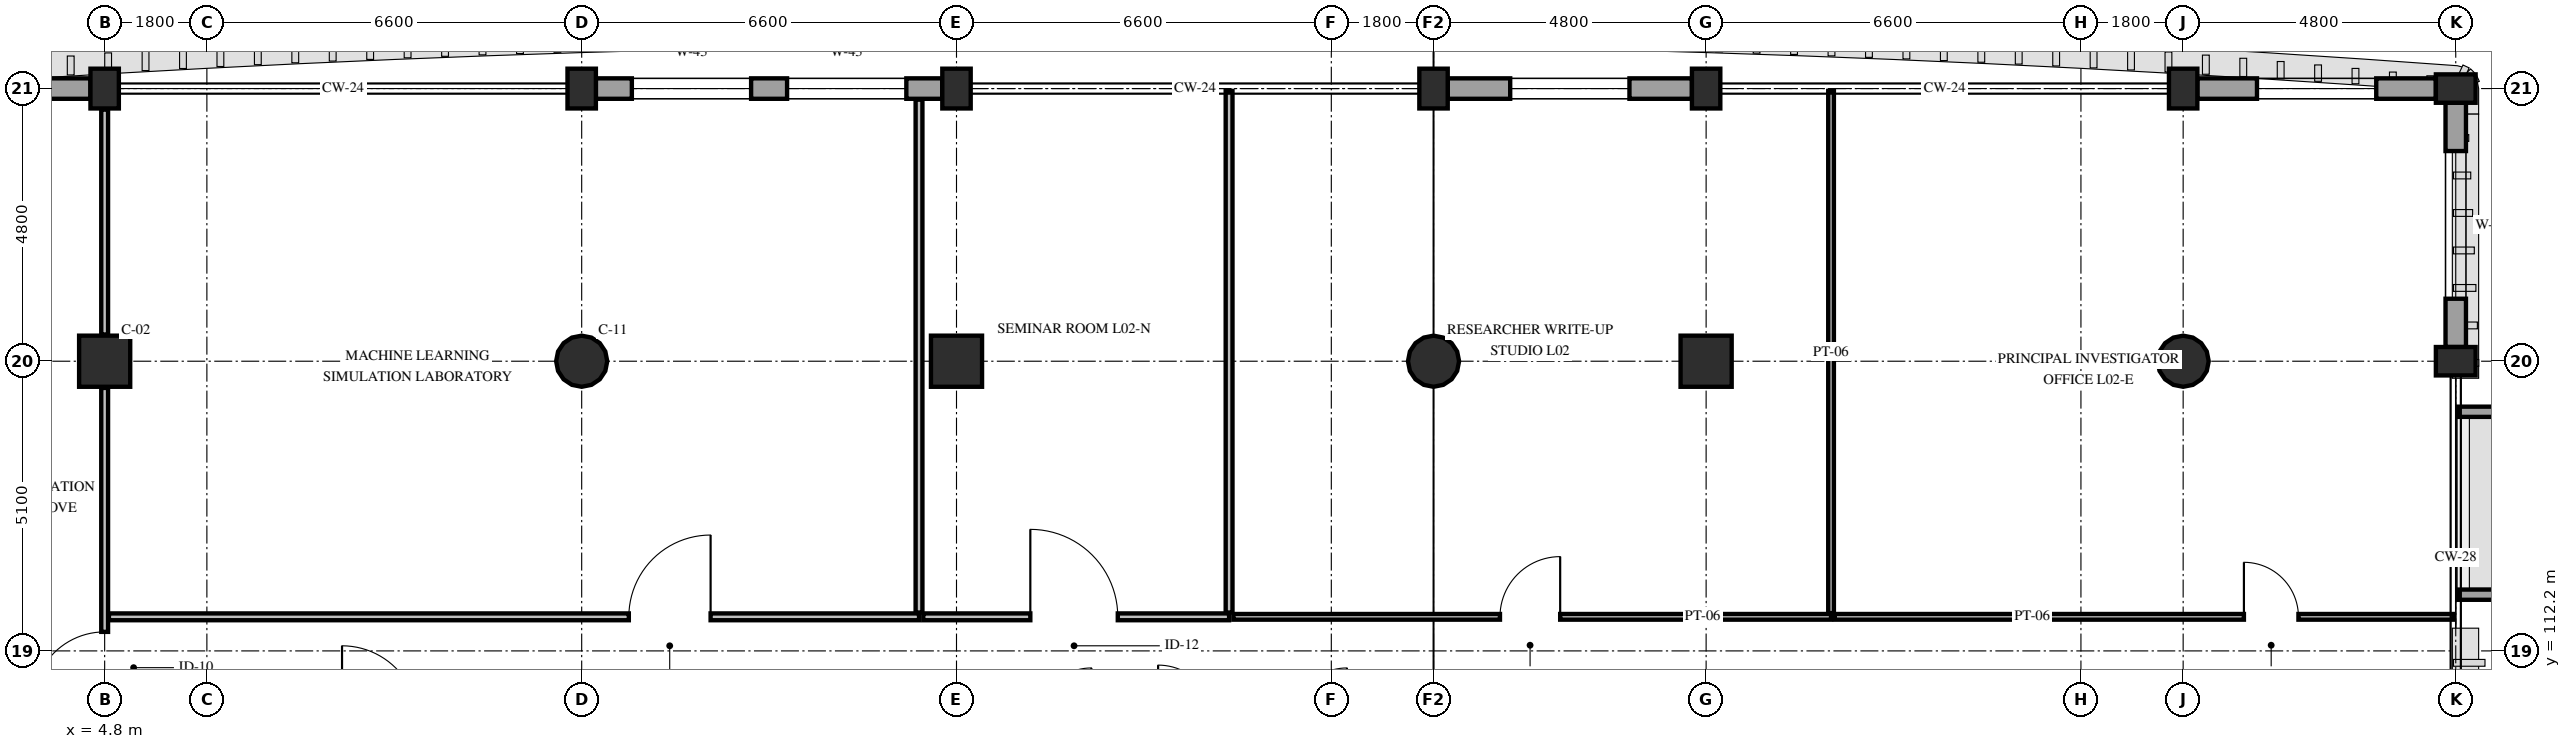
"""IFC4 building model, lengths in metres.
Left out: names, types, materials, properties, quantities, classifications, styles, units other than length and angle.
Written with IfcOpenShell. Run it as: python <this file> out.ifc"""

import sys

from ifc_helpers import new_model, si_unit, direction, frame, frame_2d, origin, origin_2d, place, context, subcontext, project, spatial, rectangle, circle, extrude, element, fill, save


model = new_model("IFC4")
c1 = context("Model", 3, precision=1e-05, world=origin(), true_north=direction((0.0, 1.0)))
c2 = subcontext(c1, "Body", "Model", "MODEL_VIEW")
j1 = project(units=[si_unit("LENGTHUNIT", "METRE"), si_unit("PLANEANGLEUNIT", "RADIAN")], contexts=[c1])
p1 = place(None, origin())
s1 = spatial("IfcSite", under=j1, at=p1, CompositionType="ELEMENT")
p2 = place(p1, origin())
s2 = spatial("IfcBuilding", under=s1, at=p2, CompositionType="ELEMENT")
p3 = place(p2, frame((0.0, 0.0, 10.2)))
s3 = spatial("IfcBuildingStorey", under=s2, at=p3, CompositionType="ELEMENT", Elevation=10.2)
p4 = place(p3, frame((4.8, 117.3, 0.0), z_axis=(0.0, 0.0, 1.0), x_axis=(1.0, 0.0, 0.0)))
e1 = element("IfcColumn", 1, at=p4, inside=s3, PredefinedType="COLUMN", context=c2, shape_type="SweptSolid", body=[
    extrude(rectangle(XDim=0.9, YDim=0.9, at=origin_2d()), origin(), (0.0, 0.0, 1.0), 4.8),
])
p5 = place(p3, frame((4.8, 122.1, 0.0), z_axis=(0.0, 0.0, 1.0), x_axis=(1.0, 0.0, 0.0)))
e2 = element("IfcColumn", 2, at=p5, inside=s3, PredefinedType="PILASTER", context=c2, shape_type="SweptSolid", body=[
    extrude(rectangle(XDim=0.5, YDim=0.7, at=origin_2d()), origin(), (0.0, 0.0, 1.0), 4.8),
])
p6 = place(p3, frame((13.2, 117.3, 0.0), z_axis=(0.0, 0.0, 1.0), x_axis=(1.0, 0.0, 0.0)))
e3 = element("IfcColumn", 3, at=p6, inside=s3, PredefinedType="COLUMN", context=c2, shape_type="SweptSolid", body=[
    extrude(circle(Radius=0.45, at=origin_2d()), origin(), (0.0, 0.0, 1.0), 4.8),
])
p7 = place(p3, frame((13.2, 122.1, 0.0), z_axis=(0.0, 0.0, 1.0), x_axis=(1.0, 0.0, 0.0)))
e4 = element("IfcColumn", 4, at=p7, inside=s3, PredefinedType="PILASTER", context=c2, shape_type="SweptSolid", body=[
    extrude(rectangle(XDim=0.5, YDim=0.7, at=origin_2d()), origin(), (0.0, 0.0, 1.0), 4.8),
])
p8 = place(p3, frame((19.8, 117.3, 0.0), z_axis=(0.0, 0.0, 1.0), x_axis=(1.0, 0.0, 0.0)))
e5 = element("IfcColumn", 5, at=p8, inside=s3, PredefinedType="COLUMN", context=c2, shape_type="SweptSolid", body=[
    extrude(rectangle(XDim=0.9, YDim=0.9, at=origin_2d()), origin(), (0.0, 0.0, 1.0), 4.8),
])
p9 = place(p3, frame((19.8, 122.1, 0.0), z_axis=(0.0, 0.0, 1.0), x_axis=(1.0, 0.0, 0.0)))
e6 = element("IfcColumn", 6, at=p9, inside=s3, PredefinedType="PILASTER", context=c2, shape_type="SweptSolid", body=[
    extrude(rectangle(XDim=0.5, YDim=0.7, at=origin_2d()), origin(), (0.0, 0.0, 1.0), 4.8),
])
p10 = place(p3, frame((28.2, 117.3, 0.0), z_axis=(0.0, 0.0, 1.0), x_axis=(1.0, 0.0, 0.0)))
e7 = element("IfcColumn", 7, at=p10, inside=s3, PredefinedType="COLUMN", context=c2, shape_type="SweptSolid", body=[
    extrude(circle(Radius=0.45, at=origin_2d()), origin(), (0.0, 0.0, 1.0), 4.8),
])
p11 = place(p3, frame((28.2, 122.1, 0.0), z_axis=(0.0, 0.0, 1.0), x_axis=(1.0, 0.0, 0.0)))
e8 = element("IfcColumn", 8, at=p11, inside=s3, PredefinedType="PILASTER", context=c2, shape_type="SweptSolid", body=[
    extrude(rectangle(XDim=0.5, YDim=0.7, at=origin_2d()), origin(), (0.0, 0.0, 1.0), 4.8),
])
p12 = place(p3, frame((33.0, 117.3, 0.0), z_axis=(0.0, 0.0, 1.0), x_axis=(1.0, 0.0, 0.0)))
e9 = element("IfcColumn", 9, at=p12, inside=s3, PredefinedType="COLUMN", context=c2, shape_type="SweptSolid", body=[
    extrude(rectangle(XDim=0.9, YDim=0.9, at=origin_2d()), origin(), (0.0, 0.0, 1.0), 4.8),
])
p13 = place(p3, frame((33.0, 122.1, 0.0), z_axis=(0.0, 0.0, 1.0), x_axis=(1.0, 0.0, 0.0)))
e10 = element("IfcColumn", 10, at=p13, inside=s3, PredefinedType="PILASTER", context=c2, shape_type="SweptSolid", body=[
    extrude(rectangle(XDim=0.5, YDim=0.7, at=origin_2d()), origin(), (0.0, 0.0, 1.0), 4.8),
])
p14 = place(p3, frame((41.4, 117.3, 0.0), z_axis=(0.0, 0.0, 1.0), x_axis=(1.0, 0.0, 0.0)))
e11 = element("IfcColumn", 11, at=p14, inside=s3, PredefinedType="COLUMN", context=c2, shape_type="SweptSolid", body=[
    extrude(circle(Radius=0.45, at=origin_2d()), origin(), (0.0, 0.0, 1.0), 4.8),
])
for number, where, z_axis, x_axis in (
    (12, (41.4, 122.1, 0.0), (0.0, 0.0, 1.0), (1.0, 0.0, 0.0)),
    (13, (46.2, 117.3, 0.0), (0.0, 0.0, 1.0), (0.0, 1.0, 0.0)),
    (14, (46.2, 122.1, 0.0), (0.0, 0.0, 1.0), (0.0, 1.0, 0.0)),
):
    element("IfcColumn", number, at=place(p3, frame(where, z_axis=z_axis, x_axis=x_axis)), inside=s3, PredefinedType="PILASTER", context=c2, shape_type="SweptSolid", body=[
        extrude(rectangle(XDim=0.5, YDim=0.7, at=origin_2d()), origin(), (0.0, 0.0, 1.0), 4.8),
    ])
p15 = place(p3, frame((0.35, 122.1, 0.0), z_axis=(0.0, 0.0, 1.0), x_axis=(1.0, 0.0, 0.0)))
e15 = element("IfcWall", 15, at=p15, inside=s3, PredefinedType="STANDARD", context=c2, shape_type="SweptSolid", body=[
    extrude(rectangle(XDim=4.2, YDim=0.36, at=frame_2d((2.1, 0.0))), origin(), (0.0, 0.0, 1.0), 3.95),
])
p16 = place(p15, frame((1.05, 0.0, 0.85)))
e16 = element("IfcOpeningElement", 16, at=p16, cuts=e15, PredefinedType="OPENING", context=c2, shape_type="SweptSolid", body=[
    extrude(rectangle(XDim=2.1, YDim=2.08, at=frame_2d((1.05, 1.04))), frame((0.0, 0.195, 0.0), z_axis=(0.0, -1.0, 0.0), x_axis=(1.0, 0.0, 0.0)), (0.0, 0.0, 1.0), 0.39),
])
p17 = place(p3, frame((13.45, 122.1, 0.0), z_axis=(0.0, 0.0, 1.0), x_axis=(1.0, 0.0, 0.0)))
e17 = element("IfcWall", 17, at=p17, inside=s3, PredefinedType="STANDARD", context=c2, shape_type="SweptSolid", body=[
    extrude(rectangle(XDim=6.1, YDim=0.36, at=frame_2d((3.05, 0.0))), origin(), (0.0, 0.0, 1.0), 3.93),
])
p18 = place(p17, frame((0.633, 0.0, 0.85)))
e18 = element("IfcOpeningElement", 18, at=p18, cuts=e17, PredefinedType="OPENING", context=c2, shape_type="SweptSolid", body=[
    extrude(rectangle(XDim=2.1, YDim=2.08, at=frame_2d((1.05, 1.04))), frame((0.0, 0.195, 0.0), z_axis=(0.0, -1.0, 0.0), x_axis=(1.0, 0.0, 0.0)), (0.0, 0.0, 1.0), 0.39),
])
p19 = place(p17, frame((3.367, 0.0, 0.85)))
e19 = element("IfcOpeningElement", 19, at=p19, cuts=e17, PredefinedType="OPENING", context=c2, shape_type="SweptSolid", body=[
    extrude(rectangle(XDim=2.1, YDim=2.08, at=frame_2d((1.05, 1.04))), frame((0.0, 0.195, 0.0), z_axis=(0.0, -1.0, 0.0), x_axis=(1.0, 0.0, 0.0)), (0.0, 0.0, 1.0), 0.39),
])
p20 = place(p3, frame((28.45, 122.1, 0.0), z_axis=(0.0, 0.0, 1.0), x_axis=(1.0, 0.0, 0.0)))
e20 = element("IfcWall", 20, at=p20, inside=s3, PredefinedType="STANDARD", context=c2, shape_type="SweptSolid", body=[
    extrude(rectangle(XDim=4.3, YDim=0.36, at=frame_2d((2.15, 0.0))), origin(), (0.0, 0.0, 1.0), 3.95),
])
p21 = place(p20, frame((1.1, 0.0, 0.85)))
e21 = element("IfcOpeningElement", 21, at=p21, cuts=e20, PredefinedType="OPENING", context=c2, shape_type="SweptSolid", body=[
    extrude(rectangle(XDim=2.1, YDim=2.08, at=frame_2d((1.05, 1.04))), frame((0.0, 0.195, 0.0), z_axis=(0.0, -1.0, 0.0), x_axis=(1.0, 0.0, 0.0)), (0.0, 0.0, 1.0), 0.39),
])
p22 = place(p3, frame((41.65, 122.1, 0.0), z_axis=(0.0, 0.0, 1.0), x_axis=(1.0, 0.0, 0.0)))
e22 = element("IfcWall", 22, at=p22, inside=s3, PredefinedType="STANDARD", context=c2, shape_type="SweptSolid", body=[
    extrude(rectangle(XDim=4.2, YDim=0.36, at=frame_2d((2.1, 0.0))), origin(), (0.0, 0.0, 1.0), 3.95),
])
p23 = place(p22, frame((1.05, 0.0, 0.85)))
e23 = element("IfcOpeningElement", 23, at=p23, cuts=e22, PredefinedType="OPENING", context=c2, shape_type="SweptSolid", body=[
    extrude(rectangle(XDim=2.1, YDim=2.08, at=frame_2d((1.05, 1.04))), frame((0.0, 0.195, 0.0), z_axis=(0.0, -1.0, 0.0), x_axis=(1.0, 0.0, 0.0)), (0.0, 0.0, 1.0), 0.39),
])
p24 = place(p3, frame((46.2, 121.85, 0.0), z_axis=(0.0, 0.0, 1.0), x_axis=(0.0, -1.0, 0.0)))
e24 = element("IfcWall", 24, at=p24, inside=s3, PredefinedType="STANDARD", context=c2, shape_type="SweptSolid", body=[
    extrude(rectangle(XDim=4.3, YDim=0.36, at=frame_2d((2.15, 0.0))), origin(), (0.0, 0.0, 1.0), 3.95),
])
p25 = place(p24, frame((0.85, 0.0, 0.85)))
e25 = element("IfcOpeningElement", 25, at=p25, cuts=e24, PredefinedType="OPENING", context=c2, shape_type="SweptSolid", body=[
    extrude(rectangle(XDim=2.6, YDim=2.08, at=frame_2d((1.3, 1.04))), frame((0.0, 0.195, 0.0), z_axis=(0.0, -1.0, 0.0), x_axis=(1.0, 0.0, 0.0)), (0.0, 0.0, 1.0), 0.39),
])
for number, where, z_axis, x_axis in (
    (26, (46.24, 113.19, 0.0), (0.0, 0.0, 1.0), (1.0, 0.0, 0.0)),
    (27, (46.24, 116.41, 0.0), (0.0, 0.0, 1.0), (1.0, 0.0, 0.0)),
):
    element("IfcWall", number, at=place(p3, frame(where, z_axis=z_axis, x_axis=x_axis)), inside=s3, PredefinedType="PARAPET", context=c2, shape_type="SweptSolid", body=[
        extrude(rectangle(XDim=72.52, YDim=0.18, at=frame_2d((36.26, 0.0))), origin(), (0.0, 0.0, 1.0), 1.12),
    ])
p26 = place(p3, frame((4.8, 111.025, 0.0), z_axis=(0.0, 0.0, 1.0), x_axis=(0.0, 1.0, 0.0)))
e28 = element("IfcWall", 28, at=p26, inside=s3, PredefinedType="PARTITIONING", context=c2, shape_type="SweptSolid", body=[
    extrude(rectangle(XDim=5.805, YDim=0.12, at=frame_2d((2.903, 0.0))), origin(), (0.0, 0.0, 1.0), 4.13),
])
p27 = place(p26, frame((0.25, 0.0, 0.0)))
e29 = element("IfcOpeningElement", 29, at=p27, cuts=e28, PredefinedType="OPENING", context=c2, shape_type="SweptSolid", body=[
    extrude(rectangle(XDim=1.26, YDim=2.2, at=frame_2d((0.63, 1.1))), frame((0.0, 0.075, 0.0), z_axis=(0.0, -1.0, 0.0), x_axis=(1.0, 0.0, 0.0)), (0.0, 0.0, 1.0), 0.15),
])
p28 = place(p3, frame((4.8, 117.77, 0.0), z_axis=(0.0, 0.0, 1.0), x_axis=(0.0, 1.0, 0.0)))
e30 = element("IfcWall", 30, at=p28, inside=s3, PredefinedType="PARTITIONING", context=c2, shape_type="SweptSolid", body=[
    extrude(rectangle(XDim=3.96, YDim=0.12, at=frame_2d((1.98, 0.0))), origin(), (0.0, 0.0, 1.0), 4.13),
])
p29 = place(p3, frame((4.875, 112.8, 0.0), z_axis=(0.0, 0.0, 1.0), x_axis=(1.0, 0.0, 0.0)))
e31 = element("IfcWall", 31, at=p29, inside=s3, PredefinedType="PARTITIONING", context=c2, shape_type="SweptSolid", body=[
    extrude(rectangle(XDim=14.265, YDim=0.12, at=frame_2d((7.132, 0.0))), origin(), (0.0, 0.0, 1.0), 4.13),
])
p30 = place(p29, frame((9.155, 0.0, 0.0)))
e32 = element("IfcOpeningElement", 32, at=p30, cuts=e31, PredefinedType="OPENING", context=c2, shape_type="SweptSolid", body=[
    extrude(rectangle(XDim=1.44, YDim=2.25, at=frame_2d((0.72, 1.125))), frame((0.0, 0.075, 0.0), z_axis=(0.0, -1.0, 0.0), x_axis=(1.0, 0.0, 0.0)), (0.0, 0.0, 1.0), 0.15),
])
p31 = place(p3, frame((19.14, 112.875, 0.0), z_axis=(0.0, 0.0, 1.0), x_axis=(0.0, 1.0, 0.0)))
e33 = element("IfcWall", 33, at=p31, inside=s3, PredefinedType="PARTITIONING", context=c2, shape_type="SweptSolid", body=[
    extrude(rectangle(XDim=9.03, YDim=0.12, at=frame_2d((4.515, 0.0))), origin(), (0.0, 0.0, 1.0), 3.93),
])
p32 = place(p3, frame((19.215, 112.8, 0.0), z_axis=(0.0, 0.0, 1.0), x_axis=(1.0, 0.0, 0.0)))
e34 = element("IfcWall", 34, at=p32, inside=s3, PredefinedType="PARTITIONING", context=c2, shape_type="SweptSolid", body=[
    extrude(rectangle(XDim=5.385, YDim=0.12, at=frame_2d((2.692, 0.0))), origin(), (0.0, 0.0, 1.0), 4.13),
])
p33 = place(p32, frame((1.885, 0.0, 0.0)))
e35 = element("IfcOpeningElement", 35, at=p33, cuts=e34, PredefinedType="OPENING", context=c2, shape_type="SweptSolid", body=[
    extrude(rectangle(XDim=1.54, YDim=2.25, at=frame_2d((0.77, 1.125))), frame((0.0, 0.075, 0.0), z_axis=(0.0, -1.0, 0.0), x_axis=(1.0, 0.0, 0.0)), (0.0, 0.0, 1.0), 0.15),
])
p34 = place(p3, frame((24.6, 112.875, 0.0), z_axis=(0.0, 0.0, 1.0), x_axis=(0.0, 1.0, 0.0)))
e36 = element("IfcWall", 36, at=p34, inside=s3, PredefinedType="PARTITIONING", context=c2, shape_type="SweptSolid", body=[
    extrude(rectangle(XDim=9.185, YDim=0.12, at=frame_2d((4.593, 0.0))), origin(), (0.0, 0.0, 1.0), 3.83),
])
p35 = place(p3, frame((24.675, 112.8, 0.0), z_axis=(0.0, 0.0, 1.0), x_axis=(1.0, 0.0, 0.0)))
e37 = element("IfcWall", 37, at=p35, inside=s3, PredefinedType="PARTITIONING", context=c2, shape_type="SweptSolid", body=[
    extrude(rectangle(XDim=10.525, YDim=0.1, at=frame_2d((5.262, 0.0))), origin(), (0.0, 0.0, 1.0), 4.13),
])
p36 = place(p35, frame((4.695, 0.0, 0.0)))
e38 = element("IfcOpeningElement", 38, at=p36, cuts=e37, PredefinedType="OPENING", context=c2, shape_type="SweptSolid", body=[
    extrude(rectangle(XDim=1.06, YDim=2.2, at=frame_2d((0.53, 1.1))), frame((0.0, 0.065, 0.0), z_axis=(0.0, -1.0, 0.0), x_axis=(1.0, 0.0, 0.0)), (0.0, 0.0, 1.0), 0.13),
])
p37 = place(p3, frame((35.2, 112.865, 0.0), z_axis=(0.0, 0.0, 1.0), x_axis=(0.0, 1.0, 0.0)))
e39 = element("IfcWall", 39, at=p37, inside=s3, PredefinedType="PARTITIONING", context=c2, shape_type="SweptSolid", body=[
    extrude(rectangle(XDim=9.195, YDim=0.1, at=frame_2d((4.598, 0.0))), origin(), (0.0, 0.0, 1.0), 3.83),
])
p38 = place(p3, frame((35.265, 112.8, 0.0), z_axis=(0.0, 0.0, 1.0), x_axis=(1.0, 0.0, 0.0)))
e40 = element("IfcWall", 40, at=p38, inside=s3, PredefinedType="PARTITIONING", context=c2, shape_type="SweptSolid", body=[
    extrude(rectangle(XDim=10.895, YDim=0.1, at=frame_2d((5.448, 0.0))), origin(), (0.0, 0.0, 1.0), 4.08),
])
p39 = place(p38, frame((7.205, 0.0, 0.0)))
e41 = element("IfcOpeningElement", 41, at=p39, cuts=e40, PredefinedType="OPENING", context=c2, shape_type="SweptSolid", body=[
    extrude(rectangle(XDim=0.96, YDim=2.15, at=frame_2d((0.48, 1.075))), frame((0.0, 0.065, 0.0), z_axis=(0.0, -1.0, 0.0), x_axis=(1.0, 0.0, 0.0)), (0.0, 0.0, 1.0), 0.13),
])
p40 = place(p18, origin())
e42 = element("IfcWindow", 42, at=p40, inside=s3, PartitioningType="DOUBLE_PANEL_VERTICAL", PredefinedType="WINDOW", context=c2, shape_type="SweptSolid", body=[
    extrude(rectangle(XDim=2.1, YDim=2.08, at=frame_2d((1.05, 1.04))), frame((0.0, 0.03, 0.0), z_axis=(0.0, -1.0, 0.0), x_axis=(1.0, 0.0, 0.0)), (0.0, 0.0, 1.0), 0.06),
])
fill(e18, e42)
p41 = place(p19, origin())
e43 = element("IfcWindow", 43, at=p41, inside=s3, PartitioningType="DOUBLE_PANEL_VERTICAL", PredefinedType="WINDOW", context=c2, shape_type="SweptSolid", body=[
    extrude(rectangle(XDim=2.1, YDim=2.08, at=frame_2d((1.05, 1.04))), frame((0.0, 0.03, 0.0), z_axis=(0.0, -1.0, 0.0), x_axis=(1.0, 0.0, 0.0)), (0.0, 0.0, 1.0), 0.06),
])
fill(e19, e43)
p42 = place(p21, origin())
e44 = element("IfcWindow", 44, at=p42, inside=s3, PartitioningType="DOUBLE_PANEL_VERTICAL", PredefinedType="WINDOW", context=c2, shape_type="SweptSolid", body=[
    extrude(rectangle(XDim=2.1, YDim=2.08, at=frame_2d((1.05, 1.04))), frame((0.0, 0.03, 0.0), z_axis=(0.0, -1.0, 0.0), x_axis=(1.0, 0.0, 0.0)), (0.0, 0.0, 1.0), 0.06),
])
fill(e21, e44)
p43 = place(p23, origin())
e45 = element("IfcWindow", 45, at=p43, inside=s3, PartitioningType="DOUBLE_PANEL_VERTICAL", PredefinedType="WINDOW", context=c2, shape_type="SweptSolid", body=[
    extrude(rectangle(XDim=2.1, YDim=2.08, at=frame_2d((1.05, 1.04))), frame((0.0, 0.03, 0.0), z_axis=(0.0, -1.0, 0.0), x_axis=(1.0, 0.0, 0.0)), (0.0, 0.0, 1.0), 0.06),
])
fill(e23, e45)
p44 = place(p25, origin())
e46 = element("IfcWindow", 46, at=p44, inside=s3, PartitioningType="DOUBLE_PANEL_VERTICAL", PredefinedType="WINDOW", context=c2, shape_type="SweptSolid", body=[
    extrude(rectangle(XDim=2.6, YDim=2.08, at=frame_2d((1.3, 1.04))), frame((0.0, 0.03, 0.0), z_axis=(0.0, -1.0, 0.0), x_axis=(1.0, 0.0, 0.0)), (0.0, 0.0, 1.0), 0.06),
])
fill(e25, e46)
p45 = place(p27, origin())
e47 = element("IfcDoor", 47, at=p45, inside=s3, OperationType="SINGLE_SWING_LEFT", PredefinedType="DOOR", context=c2, shape_type="SweptSolid", body=[
    extrude(rectangle(XDim=1.26, YDim=2.2, at=frame_2d((0.63, 1.1))), frame((0.0, 0.025, 0.0), z_axis=(0.0, -1.0, 0.0), x_axis=(1.0, 0.0, 0.0)), (0.0, 0.0, 1.0), 0.05),
])
fill(e29, e47)
p46 = place(p30, origin())
e48 = element("IfcDoor", 48, at=p46, inside=s3, OperationType="SINGLE_SWING_RIGHT", PredefinedType="DOOR", context=c2, shape_type="SweptSolid", body=[
    extrude(rectangle(XDim=1.44, YDim=2.25, at=frame_2d((0.72, 1.125))), frame((0.0, 0.025, 0.0), z_axis=(0.0, -1.0, 0.0), x_axis=(1.0, 0.0, 0.0)), (0.0, 0.0, 1.0), 0.05),
])
fill(e32, e48)
p47 = place(p33, origin())
e49 = element("IfcDoor", 49, at=p47, inside=s3, OperationType="SINGLE_SWING_LEFT", PredefinedType="DOOR", context=c2, shape_type="SweptSolid", body=[
    extrude(rectangle(XDim=1.54, YDim=2.25, at=frame_2d((0.77, 1.125))), frame((0.0, 0.025, 0.0), z_axis=(0.0, -1.0, 0.0), x_axis=(1.0, 0.0, 0.0)), (0.0, 0.0, 1.0), 0.05),
])
fill(e35, e49)
p48 = place(p36, origin())
e50 = element("IfcDoor", 50, at=p48, inside=s3, OperationType="SINGLE_SWING_RIGHT", PredefinedType="DOOR", context=c2, shape_type="SweptSolid", body=[
    extrude(rectangle(XDim=1.06, YDim=2.2, at=frame_2d((0.53, 1.1))), frame((0.0, 0.025, 0.0), z_axis=(0.0, -1.0, 0.0), x_axis=(1.0, 0.0, 0.0)), (0.0, 0.0, 1.0), 0.05),
])
fill(e38, e50)
p49 = place(p39, origin())
e51 = element("IfcDoor", 51, at=p49, inside=s3, OperationType="SINGLE_SWING_LEFT", PredefinedType="DOOR", context=c2, shape_type="SweptSolid", body=[
    extrude(rectangle(XDim=0.96, YDim=2.15, at=frame_2d((0.48, 1.075))), frame((0.0, 0.025, 0.0), z_axis=(0.0, -1.0, 0.0), x_axis=(1.0, 0.0, 0.0)), (0.0, 0.0, 1.0), 0.05),
])
fill(e41, e51)
save(model, sys.argv[1])
